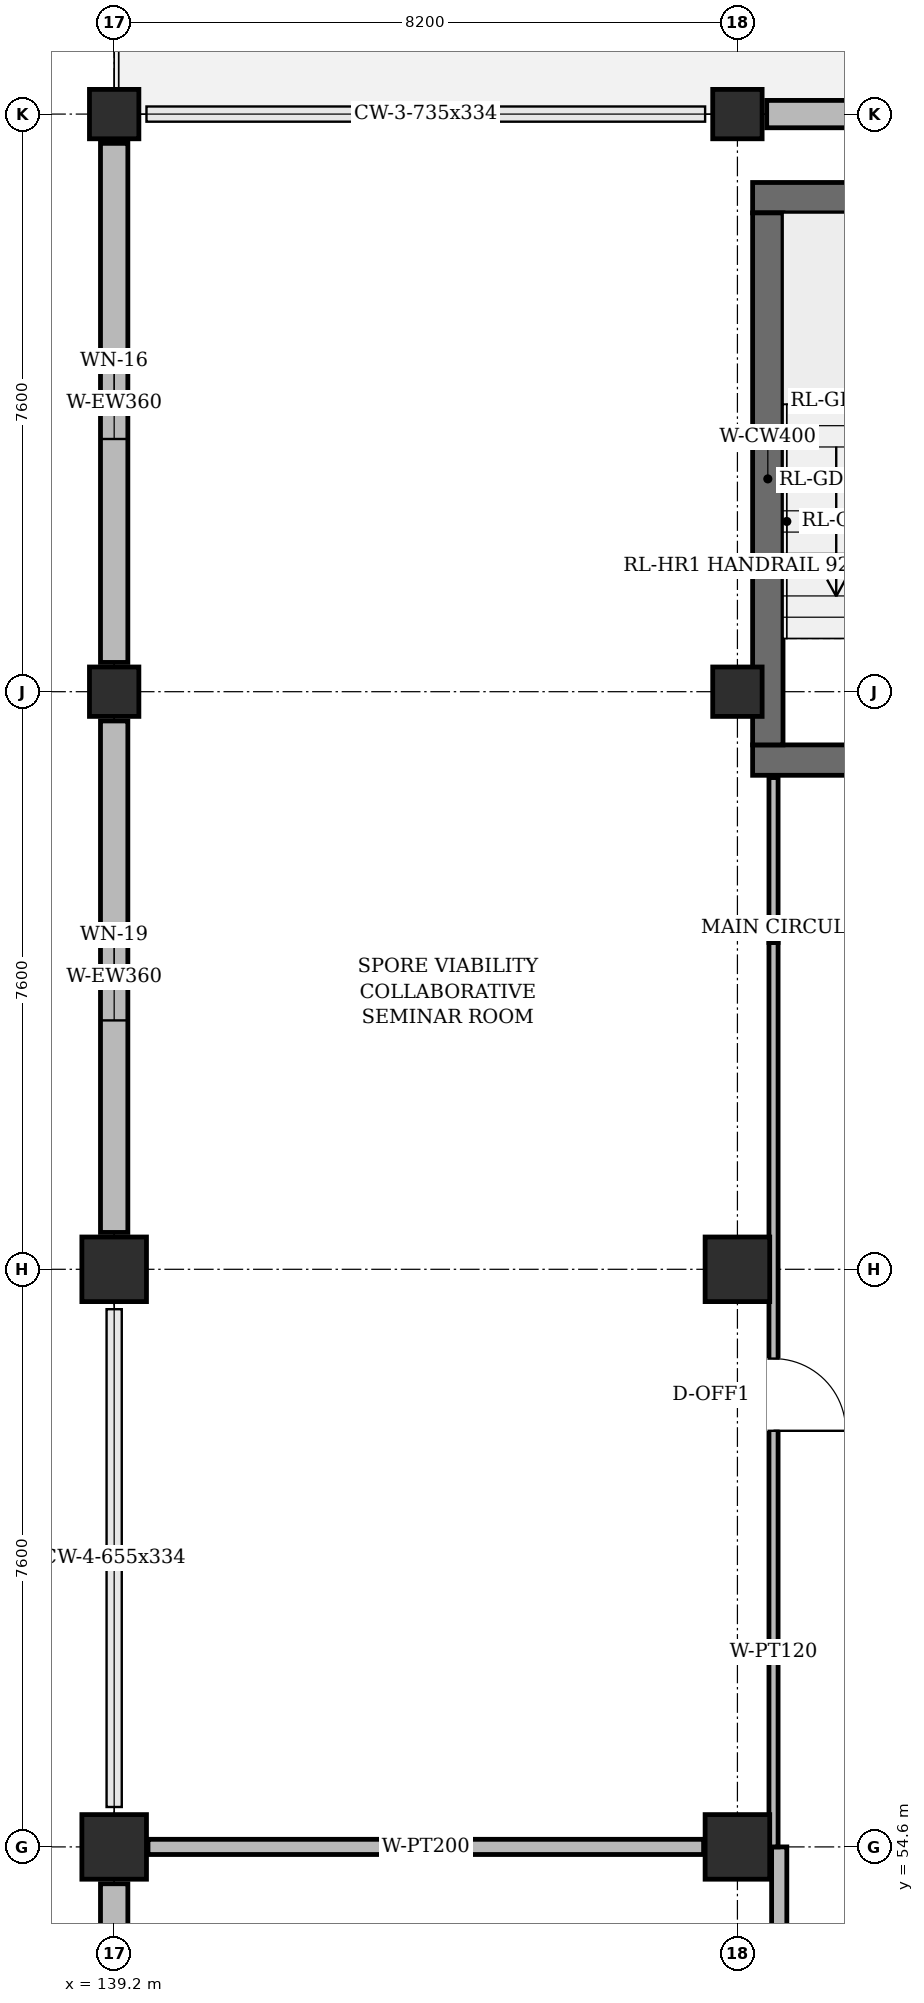
"""IFC4 building model, lengths in metres.
Left out: names, types, materials, properties, quantities, classifications, styles, units other than length and angle.
Written with IfcOpenShell. Run it as: python <this file> out.ifc"""

import sys

from ifc_helpers import new_model, si_unit, direction, frame, frame_2d, origin, origin_2d, place, context, subcontext, project, spatial, rectangle, extrude, element, fill, save


model = new_model("IFC4")
c1 = context("Model", 3, precision=1e-05, world=origin(), true_north=direction((0.0, 1.0)))
c2 = subcontext(c1, "Body", "Model", "MODEL_VIEW")
j1 = project(units=[si_unit("LENGTHUNIT", "METRE"), si_unit("PLANEANGLEUNIT", "RADIAN")], contexts=[c1])
p1 = place(None, origin())
s1 = spatial("IfcSite", under=j1, at=p1, CompositionType="ELEMENT")
p2 = place(p1, origin())
s2 = spatial("IfcBuilding", under=s1, at=p2, CompositionType="ELEMENT")
p3 = place(p2, frame((0.0, 0.0, 19.8)))
s3 = spatial("IfcBuildingStorey", under=s2, at=p3, CompositionType="ELEMENT", Elevation=19.8)
for number, where, z_axis, x_axis in (
    (1, (139.2, 54.6, 0.0), (0.0, 0.0, 1.0), (1.0, 0.0, 0.0)),
    (2, (139.2, 62.2, 0.0), (0.0, 0.0, 1.0), (1.0, 0.0, 0.0)),
):
    element("IfcColumn", number, at=place(p3, frame(where, z_axis=z_axis, x_axis=x_axis)), inside=s3, PredefinedType="COLUMN", context=c2, shape_type="SweptSolid", body=[
        extrude(rectangle(XDim=0.85, YDim=0.85, at=origin_2d()), origin(), (0.0, 0.0, 1.0), 3.94),
    ])
for number, where, z_axis, x_axis in (
    (3, (139.2, 69.8, 0.0), (0.0, 0.0, 1.0), (1.0, 0.0, 0.0)),
    (4, (139.2, 77.4, 0.0), (0.0, 0.0, 1.0), (1.0, 0.0, 0.0)),
):
    element("IfcColumn", number, at=place(p3, frame(where, z_axis=z_axis, x_axis=x_axis)), inside=s3, PredefinedType="COLUMN", context=c2, shape_type="SweptSolid", body=[
        extrude(rectangle(XDim=0.65, YDim=0.65, at=origin_2d()), origin(), (0.0, 0.0, 1.0), 3.94),
    ])
for number, where, z_axis, x_axis in (
    (5, (147.4, 54.6, 0.0), (0.0, 0.0, 1.0), (1.0, 0.0, 0.0)),
    (6, (147.4, 62.2, 0.0), (0.0, 0.0, 1.0), (1.0, 0.0, 0.0)),
):
    element("IfcColumn", number, at=place(p3, frame(where, z_axis=z_axis, x_axis=x_axis)), inside=s3, PredefinedType="COLUMN", context=c2, shape_type="SweptSolid", body=[
        extrude(rectangle(XDim=0.85, YDim=0.85, at=origin_2d()), origin(), (0.0, 0.0, 1.0), 3.94),
    ])
for number, where, z_axis, x_axis in (
    (7, (147.4, 69.8, 0.0), (0.0, 0.0, 1.0), (1.0, 0.0, 0.0)),
    (8, (147.4, 77.4, 0.0), (0.0, 0.0, 1.0), (1.0, 0.0, 0.0)),
):
    element("IfcColumn", number, at=place(p3, frame(where, z_axis=z_axis, x_axis=x_axis)), inside=s3, PredefinedType="COLUMN", context=c2, shape_type="SweptSolid", body=[
        extrude(rectangle(XDim=0.65, YDim=0.65, at=origin_2d()), origin(), (0.0, 0.0, 1.0), 3.94),
    ])
p4 = place(p3, frame((155.215, 77.4, 0.0), z_axis=(0.0, 0.0, 1.0), x_axis=(-1.0, 0.0, 0.0)))
e9 = element("IfcWall", 9, at=p4, inside=s3, PredefinedType="SOLIDWALL", context=c2, shape_type="SweptSolid", body=[
    extrude(rectangle(XDim=7.43, YDim=0.36, at=frame_2d((3.715, 0.0))), origin(), (0.0, 0.0, 1.0), 3.325),
])
p5 = place(p4, frame((2.69, 0.0, 0.95)))
e10 = element("IfcOpeningElement", 10, at=p5, cuts=e9, PredefinedType="OPENING", context=c2, shape_type="SweptSolid", body=[
    extrude(rectangle(XDim=2.05, YDim=1.5, at=frame_2d((1.025, 0.75))), frame((0.0, 0.192, 0.0), z_axis=(0.0, -1.0, 0.0), x_axis=(1.0, 0.0, 0.0)), (0.0, 0.0, 1.0), 0.384),
])
p6 = place(p3, frame((139.2, 77.015, 0.0), z_axis=(0.0, 0.0, 1.0), x_axis=(0.0, -1.0, 0.0)))
e11 = element("IfcWall", 11, at=p6, inside=s3, PredefinedType="SOLIDWALL", context=c2, shape_type="SweptSolid", body=[
    extrude(rectangle(XDim=6.83, YDim=0.36, at=frame_2d((3.415, 0.0))), origin(), (0.0, 0.0, 1.0), 3.325),
])
p7 = place(p6, frame((2.94, 0.0, 0.95)))
e12 = element("IfcOpeningElement", 12, at=p7, cuts=e11, PredefinedType="OPENING", context=c2, shape_type="SweptSolid", body=[
    extrude(rectangle(XDim=0.95, YDim=2.05, at=frame_2d((0.475, 1.025))), frame((0.0, 0.192, 0.0), z_axis=(0.0, -1.0, 0.0), x_axis=(1.0, 0.0, 0.0)), (0.0, 0.0, 1.0), 0.384),
])
p8 = place(p3, frame((139.2, 69.415, 0.0), z_axis=(0.0, 0.0, 1.0), x_axis=(0.0, -1.0, 0.0)))
e13 = element("IfcWall", 13, at=p8, inside=s3, PredefinedType="SOLIDWALL", context=c2, shape_type="SweptSolid", body=[
    extrude(rectangle(XDim=6.73, YDim=0.36, at=frame_2d((3.365, 0.0))), origin(), (0.0, 0.0, 1.0), 3.325),
])
p9 = place(p8, frame((2.79, 0.0, 0.95)))
e14 = element("IfcOpeningElement", 14, at=p9, cuts=e13, PredefinedType="OPENING", context=c2, shape_type="SweptSolid", body=[
    extrude(rectangle(XDim=1.15, YDim=1.75, at=frame_2d((0.575, 0.875))), frame((0.0, 0.192, 0.0), z_axis=(0.0, -1.0, 0.0), x_axis=(1.0, 0.0, 0.0)), (0.0, 0.0, 1.0), 0.384),
])
p10 = place(p3, frame((139.2, 54.115, 0.0), z_axis=(0.0, 0.0, 1.0), x_axis=(0.0, -1.0, 0.0)))
e15 = element("IfcWall", 15, at=p10, inside=s3, PredefinedType="SOLIDWALL", context=c2, shape_type="SweptSolid", body=[
    extrude(rectangle(XDim=6.63, YDim=0.36, at=frame_2d((3.315, 0.0))), origin(), (0.0, 0.0, 1.0), 3.325),
])
p11 = place(p10, frame((2.54, 0.0, 0.95)))
e16 = element("IfcOpeningElement", 16, at=p11, cuts=e15, PredefinedType="OPENING", context=c2, shape_type="SweptSolid", body=[
    extrude(rectangle(XDim=1.55, YDim=1.25, at=frame_2d((0.775, 0.625))), frame((0.0, 0.192, 0.0), z_axis=(0.0, -1.0, 0.0), x_axis=(1.0, 0.0, 0.0)), (0.0, 0.0, 1.0), 0.384),
])
p12 = place(p3, frame((147.6, 68.9, 0.0), z_axis=(0.0, 0.0, 1.0), x_axis=(1.0, 0.0, 0.0)))
e17 = element("IfcWall", 17, at=p12, inside=s3, PredefinedType="SHEAR", context=c2, shape_type="SweptSolid", body=[
    extrude(rectangle(XDim=3.8, YDim=0.4, at=frame_2d((1.9, 0.0))), origin(), (0.0, 0.0, 1.0), 3.94),
])
p13 = place(p12, frame((1.3, 0.0, 0.0)))
e18 = element("IfcOpeningElement", 18, at=p13, cuts=e17, PredefinedType="OPENING", context=c2, shape_type="SweptSolid", body=[
    extrude(rectangle(XDim=1.2, YDim=2.2, at=frame_2d((0.6, 1.1))), frame((0.0, 0.212, 0.0), z_axis=(0.0, -1.0, 0.0), x_axis=(1.0, 0.0, 0.0)), (0.0, 0.0, 1.0), 0.424),
])
p14 = place(p3, frame((147.6, 76.3, 0.0), z_axis=(0.0, 0.0, 1.0), x_axis=(1.0, 0.0, 0.0)))
e19 = element("IfcWall", 19, at=p14, inside=s3, PredefinedType="SHEAR", context=c2, shape_type="SweptSolid", body=[
    extrude(rectangle(XDim=3.8, YDim=0.4, at=frame_2d((1.9, 0.0))), origin(), (0.0, 0.0, 1.0), 3.94),
])
p15 = place(p3, frame((147.8, 69.1, 0.0), z_axis=(0.0, 0.0, 1.0), x_axis=(0.0, 1.0, 0.0)))
e20 = element("IfcWall", 20, at=p15, inside=s3, PredefinedType="SHEAR", context=c2, shape_type="SweptSolid", body=[
    extrude(rectangle(XDim=7.0, YDim=0.4, at=frame_2d((3.5, 0.0))), origin(), (0.0, 0.0, 1.0), 3.94),
])
p16 = place(p3, frame((147.95, 46.51, 0.0), z_axis=(0.0, 0.0, 1.0), x_axis=(0.0, 1.0, 0.0)))
e21 = element("IfcWall", 21, at=p16, inside=s3, PredefinedType="PARTITIONING", context=c2, shape_type="SweptSolid", body=[
    extrude(rectangle(XDim=8.09, YDim=0.2, at=frame_2d((4.045, 0.0))), origin(), (0.0, 0.0, 1.0), 3.805),
])
p17 = place(p16, frame((3.245, 0.0, 0.0)))
e22 = element("IfcOpeningElement", 22, at=p17, cuts=e21, PredefinedType="OPENING", context=c2, shape_type="SweptSolid", body=[
    extrude(rectangle(XDim=1.6, YDim=2.3, at=frame_2d((0.8, 1.15))), frame((0.0, 0.112, 0.0), z_axis=(0.0, -1.0, 0.0), x_axis=(1.0, 0.0, 0.0)), (0.0, 0.0, 1.0), 0.224),
])
p18 = place(p3, frame((147.875, 54.6, 0.0), z_axis=(0.0, 0.0, 1.0), x_axis=(0.0, 1.0, 0.0)))
e23 = element("IfcWall", 23, at=p18, inside=s3, PredefinedType="PARTITIONING", context=c2, shape_type="SweptSolid", body=[
    extrude(rectangle(XDim=11.9, YDim=0.12, at=frame_2d((5.95, 0.0))), origin(), (0.0, 0.0, 1.0), 3.805),
])
p19 = place(p18, frame((5.475, 0.0, 0.0)))
e24 = element("IfcOpeningElement", 24, at=p19, cuts=e23, PredefinedType="OPENING", context=c2, shape_type="SweptSolid", body=[
    extrude(rectangle(XDim=0.95, YDim=2.2, at=frame_2d((0.475, 1.1))), frame((0.0, 0.072, 0.0), z_axis=(0.0, -1.0, 0.0), x_axis=(1.0, 0.0, 0.0)), (0.0, 0.0, 1.0), 0.144),
])
p20 = place(p3, frame((147.875, 66.5, 0.0), z_axis=(0.0, 0.0, 1.0), x_axis=(0.0, 1.0, 0.0)))
e25 = element("IfcWall", 25, at=p20, inside=s3, PredefinedType="PARTITIONING", context=c2, shape_type="SweptSolid", body=[
    extrude(rectangle(XDim=2.17, YDim=0.12, at=frame_2d((1.085, 0.0))), origin(), (0.0, 0.0, 1.0), 3.805),
])
p21 = place(p3, frame((139.645, 54.6, 0.0), z_axis=(0.0, 0.0, 1.0), x_axis=(1.0, 0.0, 0.0)))
e26 = element("IfcWall", 26, at=p21, inside=s3, PredefinedType="PARTITIONING", context=c2, shape_type="SweptSolid", body=[
    extrude(rectangle(XDim=7.31, YDim=0.2, at=frame_2d((3.655, 0.0))), origin(), (0.0, 0.0, 1.0), 3.275),
])
p22 = place(p7, origin())
e27 = element("IfcWindow", 27, at=p22, inside=s3, PartitioningType="SINGLE_PANEL", PredefinedType="WINDOW", context=c2, shape_type="SweptSolid", body=[
    extrude(rectangle(XDim=0.95, YDim=2.05, at=frame_2d((0.475, 1.025))), frame((0.0, 0.03, 0.0), z_axis=(0.0, -1.0, 0.0), x_axis=(1.0, 0.0, 0.0)), (0.0, 0.0, 1.0), 0.06),
])
fill(e12, e27)
p23 = place(p9, origin())
e28 = element("IfcWindow", 28, at=p23, inside=s3, PartitioningType="SINGLE_PANEL", PredefinedType="WINDOW", context=c2, shape_type="SweptSolid", body=[
    extrude(rectangle(XDim=1.15, YDim=1.75, at=frame_2d((0.575, 0.875))), frame((0.0, 0.03, 0.0), z_axis=(0.0, -1.0, 0.0), x_axis=(1.0, 0.0, 0.0)), (0.0, 0.0, 1.0), 0.06),
])
fill(e14, e28)
p24 = place(p19, frame((0.95, 0.0, 0.0), z_axis=(0.0, 0.0, 1.0), x_axis=(-1.0, 0.0, 0.0)))
e29 = element("IfcDoor", 29, at=p24, inside=s3, OperationType="SINGLE_SWING_RIGHT", PredefinedType="DOOR", context=c2, shape_type="SweptSolid", body=[
    extrude(rectangle(XDim=0.95, YDim=2.2, at=frame_2d((0.475, 1.1))), frame((0.0, 0.025, 0.0), z_axis=(0.0, -1.0, 0.0), x_axis=(1.0, 0.0, 0.0)), (0.0, 0.0, 1.0), 0.05),
])
fill(e24, e29)
save(model, sys.argv[1])
